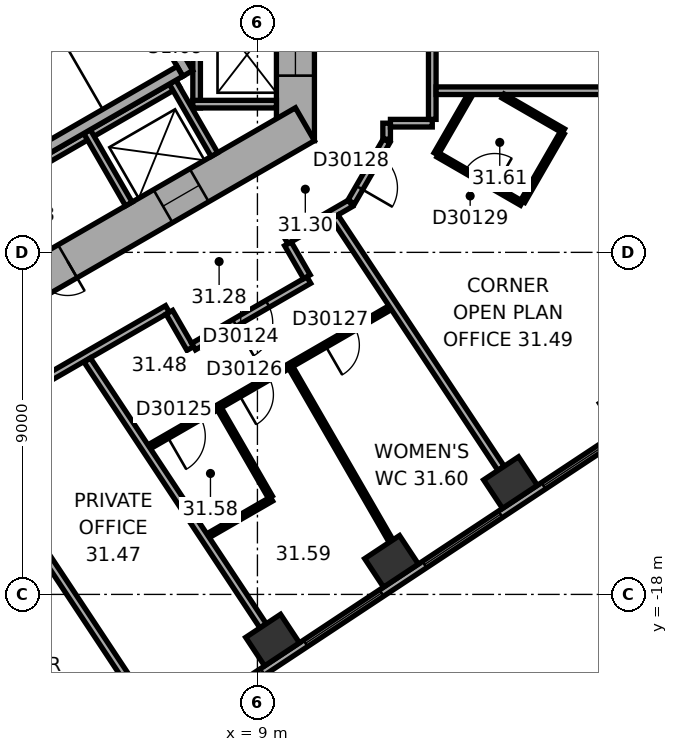
"""IFC4 building model, lengths in metres.
Left out: names, types, materials, properties, quantities, classifications, styles, units other than length and angle.
Written with IfcOpenShell. Run it as: python <this file> out.ifc"""

import sys

from ifc_helpers import new_model, si_unit, direction, frame, frame_2d, origin, origin_2d, place, context, subcontext, project, spatial, rectangle, extrude, element, fill, save


model = new_model("IFC4")
c1 = context("Model", 3, precision=1e-05, world=origin(), true_north=direction((0.0, 1.0)))
c2 = subcontext(c1, "Body", "Model", "MODEL_VIEW")
j1 = project(units=[si_unit("LENGTHUNIT", "METRE"), si_unit("PLANEANGLEUNIT", "RADIAN")], contexts=[c1])
p1 = place(None, origin())
s1 = spatial("IfcSite", under=j1, at=p1, CompositionType="ELEMENT")
p2 = place(p1, origin())
s2 = spatial("IfcBuilding", under=s1, at=p2, CompositionType="ELEMENT")
p3 = place(p2, frame((0.0, 0.0, 128.1)))
s3 = spatial("IfcBuildingStorey", under=s2, at=p3, CompositionType="ELEMENT", Elevation=128.1)
for number, where, z_axis, x_axis in (
    (1, (9.398, -19.202, 0.0), (0.0, 0.0, 1.0), (0.834, 0.552, 0.0)),
    (2, (12.529, -17.13, 0.0), (0.0, 0.0, 1.0), (0.834, 0.552, 0.0)),
    (3, (15.659, -15.058, 0.0), (0.0, 0.0, 1.0), (0.834, 0.552, 0.0)),
):
    element("IfcColumn", number, at=place(p3, frame(where, z_axis=z_axis, x_axis=x_axis)), inside=s3, PredefinedType="COLUMN", context=c2, shape_type="SweptSolid", body=[
        extrude(rectangle(XDim=1.1, YDim=0.9, at=origin_2d()), origin(), (0.0, 0.0, 1.0), 3.7),
    ])
p4 = place(p3, frame((10.0, -6.062, 0.0), z_axis=(0.0, 0.0, 1.0), x_axis=(0.0, 1.0, 0.0)))
e4 = element("IfcWall", 4, at=p4, inside=s3, PredefinedType="SHEAR", context=c2, shape_type="SweptSolid", body=[
    extrude(rectangle(XDim=12.125, YDim=1.0, at=frame_2d((6.062, 0.0))), origin(), (0.0, 0.0, 1.0), 3.7),
])
p5 = place(p4, frame((6.262, 0.0, 0.0)))
e5 = element("IfcOpeningElement", 5, at=p5, cuts=e4, PredefinedType="OPENING", context=c2, shape_type="SweptSolid", body=[
    extrude(rectangle(XDim=1.5, YDim=2.1, at=frame_2d((0.75, 1.05))), frame((0.0, 0.51, 0.0), z_axis=(0.0, -1.0, 0.0), x_axis=(1.0, 0.0, 0.0)), (0.0, 0.0, 1.0), 1.02),
])
p6 = place(p4, frame((1.712, 0.0, 0.0)))
e6 = element("IfcOpeningElement", 6, at=p6, cuts=e4, PredefinedType="OPENING", context=c2, shape_type="SweptSolid", body=[
    extrude(rectangle(XDim=1.1, YDim=2.1, at=frame_2d((0.55, 1.05))), frame((0.0, 0.51, 0.0), z_axis=(0.0, -1.0, 0.0), x_axis=(1.0, 0.0, 0.0)), (0.0, 0.0, 1.0), 1.02),
])
p7 = place(p4, frame((4.312, 0.0, 0.0)))
e7 = element("IfcOpeningElement", 7, at=p7, cuts=e4, PredefinedType="OPENING", context=c2, shape_type="SweptSolid", body=[
    extrude(rectangle(XDim=1.1, YDim=2.1, at=frame_2d((0.55, 1.05))), frame((0.0, 0.51, 0.0), z_axis=(0.0, -1.0, 0.0), x_axis=(1.0, 0.0, 0.0)), (0.0, 0.0, 1.0), 1.02),
])
p8 = place(p3, frame((-0.25, -11.691, 0.0), z_axis=(0.0, 0.0, 1.0), x_axis=(0.866022616891, 0.50000482701, 0.0)))
e8 = element("IfcWall", 8, at=p8, inside=s3, PredefinedType="SHEAR", context=c2, shape_type="SweptSolid", body=[
    extrude(rectangle(XDim=12.125, YDim=1.0, at=frame_2d((6.062, 0.0))), origin(), (0.0, 0.0, 1.0), 3.7),
])
p9 = place(p8, frame((4.012, 0.0, 0.0)))
e9 = element("IfcOpeningElement", 9, at=p9, cuts=e8, PredefinedType="OPENING", context=c2, shape_type="SweptSolid", body=[
    extrude(rectangle(XDim=0.9, YDim=2.1, at=frame_2d((0.45, 1.05))), frame((0.0, 0.51, 0.0), z_axis=(0.0, -1.0, 0.0), x_axis=(1.0, 0.0, 0.0)), (0.0, 0.0, 1.0), 1.02),
])
p10 = place(p8, frame((7.812, 0.0, 0.0)))
e10 = element("IfcOpeningElement", 10, at=p10, cuts=e8, PredefinedType="OPENING", context=c2, shape_type="SweptSolid", body=[
    extrude(rectangle(XDim=1.1, YDim=2.1, at=frame_2d((0.55, 1.05))), frame((0.0, 0.51, 0.0), z_axis=(0.0, -1.0, 0.0), x_axis=(1.0, 0.0, 0.0)), (0.0, 0.0, 1.0), 1.02),
])
p11 = place(p3, frame((2.911, -24.156, 0.0), z_axis=(0.0, 0.0, 1.0), x_axis=(0.833882163564, 0.551942512668, 0.0)))
e11 = element("IfcWall", 11, at=p11, inside=s3, PredefinedType="STANDARD", context=c2, shape_type="SweptSolid", body=[
    extrude(rectangle(XDim=20.044, YDim=0.2, at=frame_2d((10.022, 0.0))), origin(), (0.0, 0.0, 1.0), 3.7),
])
p12 = place(p11, frame((1.313, 0.0, 0.9)))
e12 = element("IfcOpeningElement", 12, at=p12, cuts=e11, PredefinedType="OPENING", context=c2, shape_type="SweptSolid", body=[
    extrude(rectangle(XDim=2.4, YDim=2.0, at=frame_2d((1.2, 1.0))), frame((0.0, 0.11, 0.0), z_axis=(0.0, -1.0, 0.0), x_axis=(1.0, 0.0, 0.0)), (0.0, 0.0, 1.0), 0.22),
])
p13 = place(p11, frame((5.067, 0.0, 0.9)))
e13 = element("IfcOpeningElement", 13, at=p13, cuts=e11, PredefinedType="OPENING", context=c2, shape_type="SweptSolid", body=[
    extrude(rectangle(XDim=2.4, YDim=2.0, at=frame_2d((1.2, 1.0))), frame((0.0, 0.11, 0.0), z_axis=(0.0, -1.0, 0.0), x_axis=(1.0, 0.0, 0.0)), (0.0, 0.0, 1.0), 0.22),
])
p14 = place(p11, frame((8.821, 0.0, 0.9)))
e14 = element("IfcOpeningElement", 14, at=p14, cuts=e11, PredefinedType="OPENING", context=c2, shape_type="SweptSolid", body=[
    extrude(rectangle(XDim=2.4, YDim=2.0, at=frame_2d((1.2, 1.0))), frame((0.0, 0.11, 0.0), z_axis=(0.0, -1.0, 0.0), x_axis=(1.0, 0.0, 0.0)), (0.0, 0.0, 1.0), 0.22),
])
p15 = place(p11, frame((12.575, 0.0, 0.9)))
e15 = element("IfcOpeningElement", 15, at=p15, cuts=e11, PredefinedType="OPENING", context=c2, shape_type="SweptSolid", body=[
    extrude(rectangle(XDim=2.4, YDim=2.0, at=frame_2d((1.2, 1.0))), frame((0.0, 0.11, 0.0), z_axis=(0.0, -1.0, 0.0), x_axis=(1.0, 0.0, 0.0)), (0.0, 0.0, 1.0), 0.22),
])
p16 = place(p11, frame((16.329, 0.0, 0.9)))
e16 = element("IfcOpeningElement", 16, at=p16, cuts=e11, PredefinedType="OPENING", context=c2, shape_type="SweptSolid", body=[
    extrude(rectangle(XDim=2.4, YDim=2.0, at=frame_2d((1.2, 1.0))), frame((0.0, 0.11, 0.0), z_axis=(0.0, -1.0, 0.0), x_axis=(1.0, 0.0, 0.0)), (0.0, 0.0, 1.0), 0.22),
])
p17 = place(p3, frame((7.4, -5.2, 0.0), z_axis=(0.0, 0.0, 1.0), x_axis=(0.0, 1.0, 0.0)))
e17 = element("IfcWall", 17, at=p17, inside=s3, PredefinedType="PARTITIONING", context=c2, shape_type="SweptSolid", body=[
    extrude(rectangle(XDim=5.4, YDim=0.2, at=frame_2d((2.7, 0.0))), origin(), (0.0, 0.0, 1.0), 3.42),
])
p18 = place(p3, frame((7.3, -5.1, 0.0), z_axis=(0.0, 0.0, 1.0), x_axis=(1.0, 0.0, 0.0)))
e18 = element("IfcWall", 18, at=p18, inside=s3, PredefinedType="PARTITIONING", context=c2, shape_type="SweptSolid", body=[
    extrude(rectangle(XDim=2.2, YDim=0.2, at=frame_2d((1.1, 0.0))), origin(), (0.0, 0.0, 1.0), 3.42),
])
p19 = place(p3, frame((-0.024, -8.559, 0.0), z_axis=(0.0, 0.0, 1.0), x_axis=(0.866026010844, 0.49999894854, 0.0)))
e19 = element("IfcWall", 19, at=p19, inside=s3, PredefinedType="PARTITIONING", context=c2, shape_type="SweptSolid", body=[
    extrude(rectangle(XDim=8.0, YDim=0.2, at=frame_2d((4.0, 0.0))), origin(), (0.0, 0.0, 1.0), 3.42),
])
for number, where, z_axis, x_axis in (
    (20, (4.516, -5.822, 0.0), (0.0, 0.0, 1.0), (0.5, -0.866, 0.0)),
    (21, (6.768, -4.522, 0.0), (0.0, 0.0, 1.0), (0.5, -0.866, 0.0)),
):
    element("IfcWall", number, at=place(p3, frame(where, z_axis=z_axis, x_axis=x_axis)), inside=s3, PredefinedType="PARTITIONING", context=c2, shape_type="SweptSolid", body=[
        extrude(rectangle(XDim=2.2, YDim=0.2, at=frame_2d((1.1, 0.0))), origin(), (0.0, 0.0, 1.0), 3.42),
    ])
p20 = place(p3, frame((4.816, -0.222, 0.0), z_axis=(0.0, 0.0, 1.0), x_axis=(0.499977259774, -0.866038532462, 0.0)))
e22 = element("IfcWall", 22, at=p20, inside=s3, PredefinedType="SHEAR", context=c2, shape_type="SweptSolid", body=[
    extrude(rectangle(XDim=4.7, YDim=0.3, at=frame_2d((2.35, 0.0))), origin(), (0.0, 0.0, 1.0), 3.42),
])
for number, where, z_axis, x_axis in (
    (23, (-1.353, -3.957, 0.0), (0.0, 0.0, 1.0), (0.866, 0.5, 0.0)),
    (24, (0.847, -7.767, 0.0), (0.0, 0.0, 1.0), (0.866, 0.5, 0.0)),
):
    element("IfcWall", number, at=place(p3, frame(where, z_axis=z_axis, x_axis=x_axis)), inside=s3, PredefinedType="SHEAR", context=c2, shape_type="SweptSolid", body=[
        extrude(rectangle(XDim=7.06, YDim=0.3, at=frame_2d((3.53, 0.0))), origin(), (0.0, 0.0, 1.0), 3.42),
    ])
p21 = place(p3, frame((1.204, -13.623, 0.0), z_axis=(0.0, 0.0, 1.0), x_axis=(0.866031867142, 0.49998880497, 0.0)))
e25 = element("IfcWall", 25, at=p21, inside=s3, PredefinedType="PARTITIONING", context=c2, shape_type="SweptSolid", body=[
    extrude(rectangle(XDim=6.268, YDim=0.2, at=frame_2d((3.134, 0.0))), origin(), (0.0, 0.0, 1.0), 3.42),
])
p22 = place(p21, frame((1.381, 0.0, 0.0)))
e26 = element("IfcOpeningElement", 26, at=p22, cuts=e25, PredefinedType="OPENING", context=c2, shape_type="SweptSolid", body=[
    extrude(rectangle(XDim=1.0, YDim=2.1, at=frame_2d((0.5, 1.05))), frame((0.0, 0.11, 0.0), z_axis=(0.0, -1.0, 0.0), x_axis=(1.0, 0.0, 0.0)), (0.0, 0.0, 1.0), 0.22),
])
p23 = place(p3, frame((6.02, -20.899, 0.0), z_axis=(0.0, 0.0, 1.0), x_axis=(-0.551943990108, 0.833881185651, 0.0)))
e27 = element("IfcWall", 27, at=p23, inside=s3, PredefinedType="PARTITIONING", context=c2, shape_type="SweptSolid", body=[
    extrude(rectangle(XDim=8.615, YDim=0.2, at=frame_2d((4.308, 0.0))), origin(), (0.0, 0.0, 1.0), 3.42),
])
p24 = place(p3, frame((6.152, -14.116, 0.0), z_axis=(0.0, 0.0, 1.0), x_axis=(0.866026788224, 0.499997602072, 0.0)))
e28 = element("IfcWall", 28, at=p24, inside=s3, PredefinedType="PARTITIONING", context=c2, shape_type="SweptSolid", body=[
    extrude(rectangle(XDim=7.322, YDim=0.12, at=frame_2d((3.661, 0.0))), origin(), (0.0, 0.0, 1.0), 3.42),
])
p25 = place(p24, frame((0.55, 0.0, 0.0)))
e29 = element("IfcOpeningElement", 29, at=p25, cuts=e28, PredefinedType="OPENING", context=c2, shape_type="SweptSolid", body=[
    extrude(rectangle(XDim=1.0, YDim=2.1, at=frame_2d((0.5, 1.05))), frame((0.0, 0.07, 0.0), z_axis=(0.0, -1.0, 0.0), x_axis=(1.0, 0.0, 0.0)), (0.0, 0.0, 1.0), 0.14),
])
p26 = place(p24, frame((2.736, 0.0, 0.0)))
e30 = element("IfcOpeningElement", 30, at=p26, cuts=e28, PredefinedType="OPENING", context=c2, shape_type="SweptSolid", body=[
    extrude(rectangle(XDim=0.9, YDim=2.1, at=frame_2d((0.45, 1.05))), frame((0.0, 0.07, 0.0), z_axis=(0.0, -1.0, 0.0), x_axis=(1.0, 0.0, 0.0)), (0.0, 0.0, 1.0), 0.14),
])
p27 = place(p24, frame((5.347, 0.0, 0.0)))
e31 = element("IfcOpeningElement", 31, at=p27, cuts=e28, PredefinedType="OPENING", context=c2, shape_type="SweptSolid", body=[
    extrude(rectangle(XDim=0.9, YDim=2.1, at=frame_2d((0.45, 1.05))), frame((0.0, 0.07, 0.0), z_axis=(0.0, -1.0, 0.0), x_axis=(1.0, 0.0, 0.0)), (0.0, 0.0, 1.0), 0.14),
])
p28 = place(p3, frame((6.682, -10.576, 0.0), z_axis=(0.0, 0.0, 1.0), x_axis=(0.499978356969, -0.866037899034, 0.0)))
e32 = element("IfcWall", 32, at=p28, inside=s3, PredefinedType="PARTITIONING", context=c2, shape_type="SweptSolid", body=[
    extrude(rectangle(XDim=1.101, YDim=0.2, at=frame_2d((0.551, 0.0))), origin(), (0.0, 0.0, 1.0), 3.42),
])
p29 = place(p3, frame((7.319, -11.479, 0.0), z_axis=(0.0, 0.0, 1.0), x_axis=(0.866038154057, 0.49997791523, 0.0)))
e33 = element("IfcWall", 33, at=p29, inside=s3, PredefinedType="PARTITIONING", context=c2, shape_type="SweptSolid", body=[
    extrude(rectangle(XDim=3.502, YDim=0.2, at=frame_2d((1.751, 0.0))), origin(), (0.0, 0.0, 1.0), 3.42),
])
p30 = place(p29, frame((1.251, 0.0, 0.0)))
e34 = element("IfcOpeningElement", 34, at=p30, cuts=e33, PredefinedType="OPENING", context=c2, shape_type="SweptSolid", body=[
    extrude(rectangle(XDim=1.0, YDim=2.1, at=frame_2d((0.5, 1.05))), frame((0.0, 0.11, 0.0), z_axis=(0.0, -1.0, 0.0), x_axis=(1.0, 0.0, 0.0)), (0.0, 0.0, 1.0), 0.22),
])
p31 = place(p3, frame((7.7, -16.456, 0.0), z_axis=(0.0, 0.0, 1.0), x_axis=(0.86603803935, 0.499978113919, 0.0)))
e35 = element("IfcWall", 35, at=p31, inside=s3, PredefinedType="PARTITIONING", context=c2, shape_type="SweptSolid", body=[
    extrude(rectangle(XDim=1.929, YDim=0.12, at=frame_2d((0.964, 0.0))), origin(), (0.0, 0.0, 1.0), 3.42),
])
p32 = place(p3, frame((9.15, -18.827, 0.0), z_axis=(0.0, 0.0, 1.0), x_axis=(-0.551942527453, 0.833882153777, 0.0)))
e36 = element("IfcWall", 36, at=p32, inside=s3, PredefinedType="PARTITIONING", context=c2, shape_type="SweptSolid", body=[
    extrude(rectangle(XDim=8.386, YDim=0.2, at=frame_2d((4.193, 0.0))), origin(), (0.0, 0.0, 1.0), 2.87),
])
p33 = place(p3, frame((9.34, -15.439, 0.0), z_axis=(0.0, 0.0, 1.0), x_axis=(-0.500048396672, 0.86599746015, 0.0)))
e37 = element("IfcWall", 37, at=p33, inside=s3, PredefinedType="PARTITIONING", context=c2, shape_type="SweptSolid", body=[
    extrude(rectangle(XDim=2.68, YDim=0.12, at=frame_2d((1.34, 0.0))), origin(), (0.0, 0.0, 1.0), 3.42),
])
p34 = place(p3, frame((9.752, -8.688, 0.0), z_axis=(0.0, 0.0, 1.0), x_axis=(0.865974105138, 0.500088841337, 0.0)))
e38 = element("IfcWall", 38, at=p34, inside=s3, PredefinedType="PARTITIONING", context=c2, shape_type="SweptSolid", body=[
    extrude(rectangle(XDim=1.961, YDim=0.2, at=frame_2d((0.98, 0.0))), origin(), (0.0, 0.0, 1.0), 3.42),
])
p35 = place(p3, frame((10.302, -9.642, 0.0), z_axis=(0.0, 0.0, 1.0), x_axis=(-0.500074377092, 0.865982457891, 0.0)))
e39 = element("IfcWall", 39, at=p35, inside=s3, PredefinedType="PARTITIONING", context=c2, shape_type="SweptSolid", body=[
    extrude(rectangle(XDim=1.001, YDim=0.2, at=frame_2d((0.5, 0.0))), origin(), (0.0, 0.0, 1.0), 3.42),
])
p36 = place(p3, frame((11.47, -7.673, 0.0), z_axis=(0.0, 0.0, 1.0), x_axis=(0.499964847546, 0.866045698112, 0.0)))
e40 = element("IfcWall", 40, at=p36, inside=s3, PredefinedType="PARTITIONING", context=c2, shape_type="SweptSolid", body=[
    extrude(rectangle(XDim=1.86, YDim=0.2, at=frame_2d((0.93, 0.0))), origin(), (0.0, 0.0, 1.0), 3.42),
])
p37 = place(p36, frame((0.43, 0.0, 0.0)))
e41 = element("IfcOpeningElement", 41, at=p37, cuts=e40, PredefinedType="OPENING", context=c2, shape_type="SweptSolid", body=[
    extrude(rectangle(XDim=1.0, YDim=2.1, at=frame_2d((0.5, 1.05))), frame((0.0, 0.11, 0.0), z_axis=(0.0, -1.0, 0.0), x_axis=(1.0, 0.0, 0.0)), (0.0, 0.0, 1.0), 0.22),
])
p38 = place(p3, frame((12.4, -6.022, 0.0), z_axis=(0.0, 0.0, 1.0), x_axis=(0.0, 1.0, 0.0)))
e42 = element("IfcWall", 42, at=p38, inside=s3, PredefinedType="PARTITIONING", context=c2, shape_type="SweptSolid", body=[
    extrude(rectangle(XDim=0.421, YDim=0.2, at=frame_2d((0.21, 0.0))), origin(), (0.0, 0.0, 1.0), 3.42),
])
p39 = place(p3, frame((12.5, -5.601, 0.0), z_axis=(0.0, 0.0, 1.0), x_axis=(1.0, 0.0, 0.0)))
e43 = element("IfcWall", 43, at=p39, inside=s3, PredefinedType="PARTITIONING", context=c2, shape_type="SweptSolid", body=[
    extrude(rectangle(XDim=1.101, YDim=0.2, at=frame_2d((0.551, 0.0))), origin(), (0.0, 0.0, 1.0), 3.42),
])
p40 = place(p3, frame((12.517, -16.599, 0.0), z_axis=(0.0, 0.0, 1.0), x_axis=(-0.500013727357, 0.866017478146, 0.0)))
e44 = element("IfcWall", 44, at=p40, inside=s3, PredefinedType="PARTITIONING", context=c2, shape_type="SweptSolid", body=[
    extrude(rectangle(XDim=5.272, YDim=0.12, at=frame_2d((2.636, 0.0))), origin(), (0.0, 0.0, 1.0), 3.42),
])
p41 = place(p3, frame((13.601, -5.501, 0.0), z_axis=(0.0, 0.0, 1.0), x_axis=(0.0, 1.0, 0.0)))
e45 = element("IfcWall", 45, at=p41, inside=s3, PredefinedType="PARTITIONING", context=c2, shape_type="SweptSolid", body=[
    extrude(rectangle(XDim=5.702, YDim=0.2, at=frame_2d((2.851, 0.0))), origin(), (0.0, 0.0, 1.0), 3.42),
])
p42 = place(p41, frame((2.131, 0.0, 0.0)))
e46 = element("IfcOpeningElement", 46, at=p42, cuts=e45, PredefinedType="OPENING", context=c2, shape_type="SweptSolid", body=[
    extrude(rectangle(XDim=1.0, YDim=2.1, at=frame_2d((0.5, 1.05))), frame((0.0, 0.11, 0.0), z_axis=(0.0, -1.0, 0.0), x_axis=(1.0, 0.0, 0.0)), (0.0, 0.0, 1.0), 0.22),
])
p43 = place(p3, frame((13.701, -6.409, 0.0), z_axis=(0.0, 0.0, 1.0), x_axis=(0.500078724409, 0.865979947454, 0.0)))
e47 = element("IfcWall", 47, at=p43, inside=s3, PredefinedType="PARTITIONING", context=c2, shape_type="SweptSolid", body=[
    extrude(rectangle(XDim=1.78, YDim=0.12, at=frame_2d((0.89, 0.0))), origin(), (0.0, 0.0, 1.0), 3.42),
])
p44 = place(p3, frame((13.701, -4.747, 0.0), z_axis=(0.0, 0.0, 1.0), x_axis=(1.0, 0.0, 0.0)))
e48 = element("IfcWall", 48, at=p44, inside=s3, PredefinedType="PARTITIONING", context=c2, shape_type="SweptSolid", body=[
    extrude(rectangle(XDim=7.049, YDim=0.2, at=frame_2d((3.524, 0.0))), origin(), (0.0, 0.0, 1.0), 3.42),
])
p45 = place(p3, frame((15.411, -14.683, 0.0), z_axis=(0.0, 0.0, 1.0), x_axis=(-0.551932106251, 0.833889051427, 0.0)))
e49 = element("IfcWall", 49, at=p45, inside=s3, PredefinedType="PARTITIONING", context=c2, shape_type="SweptSolid", body=[
    extrude(rectangle(XDim=7.926, YDim=0.2, at=frame_2d((3.963, 0.0))), origin(), (0.0, 0.0, 1.0), 2.87),
])
p46 = place(p3, frame((15.464, -4.887, 0.0), z_axis=(0.0, 0.0, 1.0), x_axis=(0.866063652425, -0.499933745558, 0.0)))
e50 = element("IfcWall", 50, at=p46, inside=s3, PredefinedType="PARTITIONING", context=c2, shape_type="SweptSolid", body=[
    extrude(rectangle(XDim=1.834, YDim=0.12, at=frame_2d((0.917, 0.0))), origin(), (0.0, 0.0, 1.0), 3.42),
])
p47 = place(p3, frame((15.952, -7.709, 0.0), z_axis=(0.0, 0.0, 1.0), x_axis=(-0.866063940332, 0.4999332468, 0.0)))
e51 = element("IfcWall", 51, at=p47, inside=s3, PredefinedType="PARTITIONING", context=c2, shape_type="SweptSolid", body=[
    extrude(rectangle(XDim=2.54, YDim=0.12, at=frame_2d((1.27, 0.0))), origin(), (0.0, 0.0, 1.0), 3.42),
])
p48 = place(p47, frame((0.82, 0.0, 0.0)))
e52 = element("IfcOpeningElement", 52, at=p48, cuts=e51, PredefinedType="OPENING", context=c2, shape_type="SweptSolid", body=[
    extrude(rectangle(XDim=0.9, YDim=2.1, at=frame_2d((0.45, 1.05))), frame((0.0, 0.07, 0.0), z_axis=(0.0, -1.0, 0.0), x_axis=(1.0, 0.0, 0.0)), (0.0, 0.0, 1.0), 0.14),
])
p49 = place(p3, frame((17.022, -5.856, 0.0), z_axis=(0.0, 0.0, 1.0), x_axis=(-0.500027264788, -0.866009661879, 0.0)))
e53 = element("IfcWall", 53, at=p49, inside=s3, PredefinedType="PARTITIONING", context=c2, shape_type="SweptSolid", body=[
    extrude(rectangle(XDim=2.08, YDim=0.12, at=frame_2d((1.04, 0.0))), origin(), (0.0, 0.0, 1.0), 3.42),
])
p50 = place(p13, origin())
e54 = element("IfcWindow", 54, at=p50, inside=s3, PartitioningType="SINGLE_PANEL", PredefinedType="WINDOW", context=c2, shape_type="SweptSolid", body=[
    extrude(rectangle(XDim=2.4, YDim=2.0, at=frame_2d((1.2, 1.0))), frame((0.0, 0.03, 0.0), z_axis=(0.0, -1.0, 0.0), x_axis=(1.0, 0.0, 0.0)), (0.0, 0.0, 1.0), 0.06),
])
fill(e13, e54)
p51 = place(p14, origin())
e55 = element("IfcWindow", 55, at=p51, inside=s3, PartitioningType="SINGLE_PANEL", PredefinedType="WINDOW", context=c2, shape_type="SweptSolid", body=[
    extrude(rectangle(XDim=2.4, YDim=2.0, at=frame_2d((1.2, 1.0))), frame((0.0, 0.03, 0.0), z_axis=(0.0, -1.0, 0.0), x_axis=(1.0, 0.0, 0.0)), (0.0, 0.0, 1.0), 0.06),
])
fill(e14, e55)
p52 = place(p15, origin())
e56 = element("IfcWindow", 56, at=p52, inside=s3, PartitioningType="SINGLE_PANEL", PredefinedType="WINDOW", context=c2, shape_type="SweptSolid", body=[
    extrude(rectangle(XDim=2.4, YDim=2.0, at=frame_2d((1.2, 1.0))), frame((0.0, 0.03, 0.0), z_axis=(0.0, -1.0, 0.0), x_axis=(1.0, 0.0, 0.0)), (0.0, 0.0, 1.0), 0.06),
])
fill(e15, e56)
p53 = place(p16, origin())
e57 = element("IfcWindow", 57, at=p53, inside=s3, PartitioningType="SINGLE_PANEL", PredefinedType="WINDOW", context=c2, shape_type="SweptSolid", body=[
    extrude(rectangle(XDim=2.4, YDim=2.0, at=frame_2d((1.2, 1.0))), frame((0.0, 0.03, 0.0), z_axis=(0.0, -1.0, 0.0), x_axis=(1.0, 0.0, 0.0)), (0.0, 0.0, 1.0), 0.06),
])
fill(e16, e57)
p54 = place(p9, origin())
e58 = element("IfcDoor", 58, at=p54, inside=s3, OperationType="SINGLE_SWING_LEFT", PredefinedType="DOOR", context=c2, shape_type="SweptSolid", body=[
    extrude(rectangle(XDim=0.9, YDim=2.1, at=frame_2d((0.45, 1.05))), frame((0.0, 0.025, 0.0), z_axis=(0.0, -1.0, 0.0), x_axis=(1.0, 0.0, 0.0)), (0.0, 0.0, 1.0), 0.05),
])
fill(e9, e58)
p55 = place(p6, origin())
e59 = element("IfcDoor", 59, at=p55, inside=s3, OperationType="DOUBLE_DOOR_SLIDING", PredefinedType="DOOR", context=c2, shape_type="SweptSolid", body=[
    extrude(rectangle(XDim=1.1, YDim=2.1, at=frame_2d((0.55, 1.05))), frame((0.0, 0.025, 0.0), z_axis=(0.0, -1.0, 0.0), x_axis=(1.0, 0.0, 0.0)), (0.0, 0.0, 1.0), 0.05),
])
fill(e6, e59)
p56 = place(p10, origin())
e60 = element("IfcDoor", 60, at=p56, inside=s3, OperationType="DOUBLE_DOOR_SLIDING", PredefinedType="DOOR", context=c2, shape_type="SweptSolid", body=[
    extrude(rectangle(XDim=1.1, YDim=2.1, at=frame_2d((0.55, 1.05))), frame((0.0, 0.025, 0.0), z_axis=(0.0, -1.0, 0.0), x_axis=(1.0, 0.0, 0.0)), (0.0, 0.0, 1.0), 0.05),
])
fill(e10, e60)
p57 = place(p30, origin())
e61 = element("IfcDoor", 61, at=p57, inside=s3, OperationType="SINGLE_SWING_LEFT", PredefinedType="DOOR", context=c2, shape_type="SweptSolid", body=[
    extrude(rectangle(XDim=1.0, YDim=2.1, at=frame_2d((0.5, 1.05))), frame((0.0, 0.025, 0.0), z_axis=(0.0, -1.0, 0.0), x_axis=(1.0, 0.0, 0.0)), (0.0, 0.0, 1.0), 0.05),
])
fill(e34, e61)
p58 = place(p25, origin())
e62 = element("IfcDoor", 62, at=p58, inside=s3, OperationType="SINGLE_SWING_LEFT", PredefinedType="DOOR", context=c2, shape_type="SweptSolid", body=[
    extrude(rectangle(XDim=1.0, YDim=2.1, at=frame_2d((0.5, 1.05))), frame((0.0, 0.025, 0.0), z_axis=(0.0, -1.0, 0.0), x_axis=(1.0, 0.0, 0.0)), (0.0, 0.0, 1.0), 0.05),
])
fill(e29, e62)
p59 = place(p26, origin())
e63 = element("IfcDoor", 63, at=p59, inside=s3, OperationType="SINGLE_SWING_LEFT", PredefinedType="DOOR", context=c2, shape_type="SweptSolid", body=[
    extrude(rectangle(XDim=0.9, YDim=2.1, at=frame_2d((0.45, 1.05))), frame((0.0, 0.025, 0.0), z_axis=(0.0, -1.0, 0.0), x_axis=(1.0, 0.0, 0.0)), (0.0, 0.0, 1.0), 0.05),
])
fill(e30, e63)
p60 = place(p27, origin())
e64 = element("IfcDoor", 64, at=p60, inside=s3, OperationType="SINGLE_SWING_LEFT", PredefinedType="DOOR", context=c2, shape_type="SweptSolid", body=[
    extrude(rectangle(XDim=0.9, YDim=2.1, at=frame_2d((0.45, 1.05))), frame((0.0, 0.025, 0.0), z_axis=(0.0, -1.0, 0.0), x_axis=(1.0, 0.0, 0.0)), (0.0, 0.0, 1.0), 0.05),
])
fill(e31, e64)
p61 = place(p37, origin())
e65 = element("IfcDoor", 65, at=p61, inside=s3, OperationType="SINGLE_SWING_LEFT", PredefinedType="DOOR", context=c2, shape_type="SweptSolid", body=[
    extrude(rectangle(XDim=1.0, YDim=2.1, at=frame_2d((0.5, 1.05))), frame((0.0, 0.025, 0.0), z_axis=(0.0, -1.0, 0.0), x_axis=(1.0, 0.0, 0.0)), (0.0, 0.0, 1.0), 0.05),
])
fill(e41, e65)
p62 = place(p48, origin())
e66 = element("IfcDoor", 66, at=p62, inside=s3, OperationType="SINGLE_SWING_LEFT", PredefinedType="DOOR", context=c2, shape_type="SweptSolid", body=[
    extrude(rectangle(XDim=0.9, YDim=2.1, at=frame_2d((0.45, 1.05))), frame((0.0, 0.025, 0.0), z_axis=(0.0, -1.0, 0.0), x_axis=(1.0, 0.0, 0.0)), (0.0, 0.0, 1.0), 0.05),
])
fill(e52, e66)
save(model, sys.argv[1])
